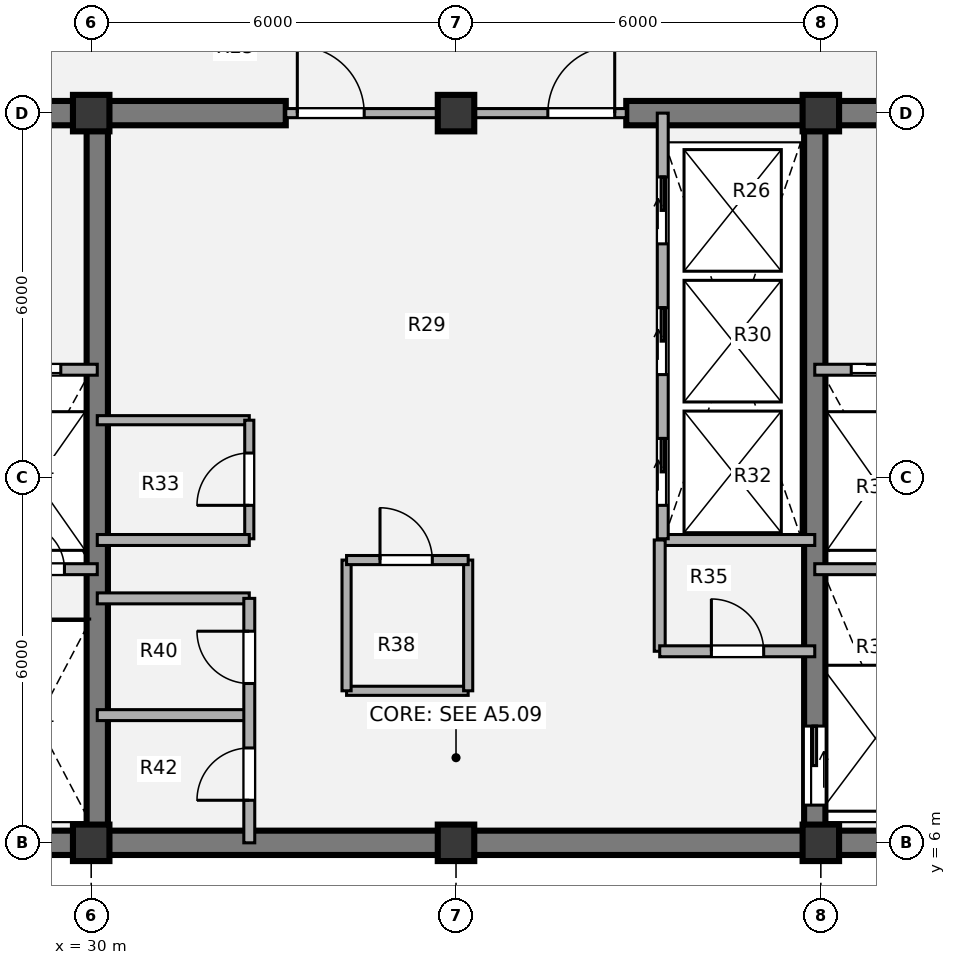
"""IFC4 building model, lengths in metres.
Left out: names, types, materials, properties, quantities, classifications, styles, units other than length and angle.
Written with IfcOpenShell. Run it as: python <this file> out.ifc"""

import sys

from ifc_helpers import new_model, si_unit, direction, frame, frame_2d, origin, origin_2d, place, context, subcontext, project, spatial, rectangle, extrude, source, transform, mapped, element, fill, save


model = new_model("IFC4")
c1 = context("Model", 3, precision=1e-05, world=origin(), true_north=direction((0.0, 1.0)))
c2 = subcontext(c1, "Body", "Model", "MODEL_VIEW")
j1 = project(units=[si_unit("LENGTHUNIT", "METRE"), si_unit("PLANEANGLEUNIT", "RADIAN")], contexts=[c1])
p1 = place(None, origin())
s1 = spatial("IfcSite", under=j1, at=p1, CompositionType="ELEMENT")
p2 = place(p1, origin())
s2 = spatial("IfcBuilding", under=s1, at=p2, CompositionType="ELEMENT")
p3 = place(p2, frame((0.0, 0.0, 264.6)))
s3 = spatial("IfcBuildingStorey", under=s2, at=p3, CompositionType="ELEMENT", Elevation=264.6)
m1 = source(origin(), c2, "Body", "SweptSolid", [
    extrude(rectangle(XDim=0.6, YDim=0.6, at=origin_2d()), origin(), (0.0, 0.0, 1.0), 3.78),
])
for number, where, z_axis, x_axis in (
    (1, (30.0, 6.0, 0.0), (0.0, 0.0, 1.0), (1.0, 0.0, 0.0)),
    (2, (36.0, 6.0, 0.0), (0.0, 0.0, 1.0), (1.0, 0.0, 0.0)),
    (3, (42.0, 6.0, 0.0), (0.0, 0.0, 1.0), (1.0, 0.0, 0.0)),
    (4, (30.0, 18.0, 0.0), (0.0, 0.0, 1.0), (1.0, 0.0, 0.0)),
    (5, (36.0, 18.0, 0.0), (0.0, 0.0, 1.0), (1.0, 0.0, 0.0)),
    (6, (42.0, 18.0, 0.0), (0.0, 0.0, 1.0), (1.0, 0.0, 0.0)),
):
    element("IfcColumn", number, at=place(p3, frame(where, z_axis=z_axis, x_axis=x_axis)), inside=s3, PredefinedType="COLUMN", context=c2, shape_type="MappedRepresentation", body=[
        mapped(m1, transform((0.0, 0.0, 0.0), x_axis=(1.0, 0.0, 0.0), y_axis=(0.0, 1.0, 0.0), z_axis=(0.0, 0.0, 1.0), scale=1.0)),
    ])
p4 = place(p3, frame((48.2, 6.0, 0.0), z_axis=(0.0, 0.0, 1.0), x_axis=(-1.0, 0.0, 0.0)))
e7 = element("IfcWall", 7, at=p4, inside=s3, PredefinedType="SHEAR", context=c2, shape_type="SweptSolid", body=[
    extrude(rectangle(XDim=24.4, YDim=0.4, at=frame_2d((12.2, 0.0))), origin(), (0.0, 0.0, 1.0), 3.78),
])
p5 = place(p3, frame((23.8, 18.0, 0.0), z_axis=(0.0, 0.0, 1.0), x_axis=(1.0, 0.0, 0.0)))
e8 = element("IfcWall", 8, at=p5, inside=s3, PredefinedType="SHEAR", context=c2, shape_type="SweptSolid", body=[
    extrude(rectangle(XDim=9.4, YDim=0.4, at=frame_2d((4.7, 0.0))), origin(), (0.0, 0.0, 1.0), 3.78),
])
p6 = place(p5, frame((2.95, 0.0, 0.0)))
e9 = element("IfcOpeningElement", 9, at=p6, cuts=e8, PredefinedType="OPENING", context=c2, shape_type="SweptSolid", body=[
    extrude(rectangle(XDim=1.1, YDim=2.1, at=origin_2d()), frame((0.55, 0.21, 1.05), z_axis=(0.0, -1.0, 0.0), x_axis=(1.0, 0.0, 0.0)), (0.0, 0.0, 1.0), 0.42),
])
p7 = place(p3, frame((38.8, 18.0, 0.0), z_axis=(0.0, 0.0, 1.0), x_axis=(1.0, 0.0, 0.0)))
e10 = element("IfcWall", 10, at=p7, inside=s3, PredefinedType="SHEAR", context=c2, shape_type="SweptSolid", body=[
    extrude(rectangle(XDim=9.4, YDim=0.4, at=frame_2d((4.7, 0.0))), origin(), (0.0, 0.0, 1.0), 3.78),
])
p8 = place(p7, frame((5.45, 0.0, 0.0)))
e11 = element("IfcOpeningElement", 11, at=p8, cuts=e10, PredefinedType="OPENING", context=c2, shape_type="SweptSolid", body=[
    extrude(rectangle(XDim=1.1, YDim=2.1, at=origin_2d()), frame((0.55, 0.21, 1.05), z_axis=(0.0, -1.0, 0.0), x_axis=(1.0, 0.0, 0.0)), (0.0, 0.0, 1.0), 0.42),
])
p9 = place(p3, frame((30.1, 6.0, 0.0), z_axis=(0.0, 0.0, 1.0), x_axis=(0.0, 1.0, 0.0)))
e12 = element("IfcWall", 12, at=p9, inside=s3, PredefinedType="SHEAR", context=c2, shape_type="SweptSolid", body=[
    extrude(rectangle(XDim=12.0, YDim=0.35, at=frame_2d((6.0, 0.0))), origin(), (0.0, 0.0, 1.0), 3.78),
])
p10 = place(p3, frame((41.9, 18.0, 0.0), z_axis=(0.0, 0.0, 1.0), x_axis=(0.0, -1.0, 0.0)))
e13 = element("IfcWall", 13, at=p10, inside=s3, PredefinedType="SHEAR", context=c2, shape_type="SweptSolid", body=[
    extrude(rectangle(XDim=12.0, YDim=0.35, at=frame_2d((6.0, 0.0))), origin(), (0.0, 0.0, 1.0), 3.78),
])
p11 = place(p10, frame((10.08, 0.0, 0.0)))
e14 = element("IfcOpeningElement", 14, at=p11, cuts=e13, PredefinedType="OPENING", context=c2, shape_type="SweptSolid", body=[
    extrude(rectangle(XDim=1.3, YDim=2.1, at=origin_2d()), frame((0.65, 0.185, 1.05), z_axis=(0.0, -1.0, 0.0), x_axis=(1.0, 0.0, 0.0)), (0.0, 0.0, 1.0), 0.37),
])
p12 = place(p3, frame((30.1, 12.95, 0.0), z_axis=(0.0, 0.0, 1.0), x_axis=(1.0, 0.0, 0.0)))
e15 = element("IfcWall", 15, at=p12, inside=s3, PredefinedType="PARTITIONING", context=c2, shape_type="SweptSolid", body=[
    extrude(rectangle(XDim=2.5, YDim=0.15, at=frame_2d((1.25, 0.0))), origin(), (0.0, 0.0, 1.0), 3.5),
])
p13 = place(p3, frame((32.6, 11.0, 0.0), z_axis=(0.0, 0.0, 1.0), x_axis=(0.0, 1.0, 0.0)))
e16 = element("IfcWall", 16, at=p13, inside=s3, PredefinedType="PARTITIONING", context=c2, shape_type="SweptSolid", body=[
    extrude(rectangle(XDim=1.95, YDim=0.15, at=frame_2d((0.975, 0.0))), origin(), (0.0, 0.0, 1.0), 3.5),
])
p14 = place(p13, frame((0.55, 0.0, 0.0)))
e17 = element("IfcOpeningElement", 17, at=p14, cuts=e16, PredefinedType="OPENING", context=c2, shape_type="SweptSolid", body=[
    extrude(rectangle(XDim=0.86, YDim=2.1, at=origin_2d()), frame((0.43, 0.085, 1.05), z_axis=(0.0, -1.0, 0.0), x_axis=(1.0, 0.0, 0.0)), (0.0, 0.0, 1.0), 0.17),
])
p15 = place(p3, frame((34.2, 8.5, 0.0), z_axis=(0.0, 0.0, 1.0), x_axis=(1.0, 0.0, 0.0)))
e18 = element("IfcWall", 18, at=p15, inside=s3, PredefinedType="PARTITIONING", context=c2, shape_type="SweptSolid", body=[
    extrude(rectangle(XDim=2.0, YDim=0.15, at=frame_2d((1.0, 0.0))), origin(), (0.0, 0.0, 1.0), 3.5),
])
p16 = place(p3, frame((34.2, 8.5, 0.0), z_axis=(0.0, 0.0, 1.0), x_axis=(0.0, 1.0, 0.0)))
e19 = element("IfcWall", 19, at=p16, inside=s3, PredefinedType="PARTITIONING", context=c2, shape_type="SweptSolid", body=[
    extrude(rectangle(XDim=2.15, YDim=0.15, at=frame_2d((1.075, 0.0))), origin(), (0.0, 0.0, 1.0), 3.5),
])
p17 = place(p3, frame((36.2, 8.5, 0.0), z_axis=(0.0, 0.0, 1.0), x_axis=(0.0, 1.0, 0.0)))
e20 = element("IfcWall", 20, at=p17, inside=s3, PredefinedType="PARTITIONING", context=c2, shape_type="SweptSolid", body=[
    extrude(rectangle(XDim=2.15, YDim=0.15, at=frame_2d((1.075, 0.0))), origin(), (0.0, 0.0, 1.0), 2.715),
])
p18 = place(p3, frame((34.2, 10.65, 0.0), z_axis=(0.0, 0.0, 1.0), x_axis=(1.0, 0.0, 0.0)))
e21 = element("IfcWall", 21, at=p18, inside=s3, PredefinedType="PARTITIONING", context=c2, shape_type="SweptSolid", body=[
    extrude(rectangle(XDim=2.0, YDim=0.15, at=frame_2d((1.0, 0.0))), origin(), (0.0, 0.0, 1.0), 3.5),
])
p19 = place(p18, frame((0.55, 0.0, 0.0)))
e22 = element("IfcOpeningElement", 22, at=p19, cuts=e21, PredefinedType="OPENING", context=c2, shape_type="SweptSolid", body=[
    extrude(rectangle(XDim=0.86, YDim=2.1, at=origin_2d()), frame((0.43, 0.085, 1.05), z_axis=(0.0, -1.0, 0.0), x_axis=(1.0, 0.0, 0.0)), (0.0, 0.0, 1.0), 0.17),
])
p20 = place(p3, frame((30.1, 10.98, 0.0), z_axis=(0.0, 0.0, 1.0), x_axis=(1.0, 0.0, 0.0)))
e23 = element("IfcWall", 23, at=p20, inside=s3, PredefinedType="PARTITIONING", context=c2, shape_type="SweptSolid", body=[
    extrude(rectangle(XDim=2.5, YDim=0.18, at=frame_2d((1.25, 0.0))), origin(), (0.0, 0.0, 1.0), 3.5),
])
p21 = place(p3, frame((39.35, 10.98, 0.0), z_axis=(0.0, 0.0, 1.0), x_axis=(1.0, 0.0, 0.0)))
e24 = element("IfcWall", 24, at=p21, inside=s3, PredefinedType="PARTITIONING", context=c2, shape_type="SweptSolid", body=[
    extrude(rectangle(XDim=2.55, YDim=0.18, at=frame_2d((1.275, 0.0))), origin(), (0.0, 0.0, 1.0), 3.5),
])
for number, where, z_axis, x_axis in (
    (25, (30.1, 8.1, 0.0), (0.0, 0.0, 1.0), (1.0, 0.0, 0.0)),
    (26, (30.1, 10.02, 0.0), (0.0, 0.0, 1.0), (1.0, 0.0, 0.0)),
):
    element("IfcWall", number, at=place(p3, frame(where, z_axis=z_axis, x_axis=x_axis)), inside=s3, PredefinedType="PARTITIONING", context=c2, shape_type="SweptSolid", body=[
        extrude(rectangle(XDim=2.5, YDim=0.18, at=frame_2d((1.25, 0.0))), origin(), (0.0, 0.0, 1.0), 3.5),
    ])
p22 = place(p3, frame((32.6, 6.0, 0.0), z_axis=(0.0, 0.0, 1.0), x_axis=(0.0, 1.0, 0.0)))
e27 = element("IfcWall", 27, at=p22, inside=s3, PredefinedType="PARTITIONING", context=c2, shape_type="SweptSolid", body=[
    extrude(rectangle(XDim=4.02, YDim=0.18, at=frame_2d((2.01, 0.0))), origin(), (0.0, 0.0, 1.0), 3.5),
])
p23 = place(p22, frame((0.7, 0.0, 0.0)))
e28 = element("IfcOpeningElement", 28, at=p23, cuts=e27, PredefinedType="OPENING", context=c2, shape_type="SweptSolid", body=[
    extrude(rectangle(XDim=0.86, YDim=2.1, at=origin_2d()), frame((0.43, 0.1, 1.05), z_axis=(0.0, -1.0, 0.0), x_axis=(1.0, 0.0, 0.0)), (0.0, 0.0, 1.0), 0.2),
])
p24 = place(p22, frame((2.62, 0.0, 0.0)))
e29 = element("IfcOpeningElement", 29, at=p24, cuts=e27, PredefinedType="OPENING", context=c2, shape_type="SweptSolid", body=[
    extrude(rectangle(XDim=0.86, YDim=2.1, at=origin_2d()), frame((0.43, 0.1, 1.05), z_axis=(0.0, -1.0, 0.0), x_axis=(1.0, 0.0, 0.0)), (0.0, 0.0, 1.0), 0.2),
])
p25 = place(p3, frame((39.35, 9.15, 0.0), z_axis=(0.0, 0.0, 1.0), x_axis=(0.0, 1.0, 0.0)))
e30 = element("IfcWall", 30, at=p25, inside=s3, PredefinedType="PARTITIONING", context=c2, shape_type="SweptSolid", body=[
    extrude(rectangle(XDim=1.83, YDim=0.18, at=frame_2d((0.915, 0.0))), origin(), (0.0, 0.0, 1.0), 3.5),
])
p26 = place(p3, frame((39.35, 9.15, 0.0), z_axis=(0.0, 0.0, 1.0), x_axis=(1.0, 0.0, 0.0)))
e31 = element("IfcWall", 31, at=p26, inside=s3, PredefinedType="PARTITIONING", context=c2, shape_type="SweptSolid", body=[
    extrude(rectangle(XDim=2.55, YDim=0.18, at=frame_2d((1.275, 0.0))), origin(), (0.0, 0.0, 1.0), 3.5),
])
p27 = place(p26, frame((0.85, 0.0, 0.0)))
e32 = element("IfcOpeningElement", 32, at=p27, cuts=e31, PredefinedType="OPENING", context=c2, shape_type="SweptSolid", body=[
    extrude(rectangle(XDim=0.86, YDim=2.1, at=origin_2d()), frame((0.43, 0.1, 1.05), z_axis=(0.0, -1.0, 0.0), x_axis=(1.0, 0.0, 0.0)), (0.0, 0.0, 1.0), 0.2),
])
p28 = place(p3, frame((33.2, 18.0, 0.0), z_axis=(0.0, 0.0, 1.0), x_axis=(1.0, 0.0, 0.0)))
e33 = element("IfcWall", 33, at=p28, inside=s3, PredefinedType="PARTITIONING", context=c2, shape_type="SweptSolid", body=[
    extrude(rectangle(XDim=5.6, YDim=0.15, at=frame_2d((2.8, 0.0))), origin(), (0.0, 0.0, 1.0), 2.515),
])
p29 = place(p28, frame((0.19, 0.0, 0.0)))
e34 = element("IfcOpeningElement", 34, at=p29, cuts=e33, PredefinedType="OPENING", context=c2, shape_type="SweptSolid", body=[
    extrude(rectangle(XDim=1.1, YDim=2.1, at=origin_2d()), frame((0.55, 0.085, 1.05), z_axis=(0.0, -1.0, 0.0), x_axis=(1.0, 0.0, 0.0)), (0.0, 0.0, 1.0), 0.17),
])
p30 = place(p28, frame((4.31, 0.0, 0.0)))
e35 = element("IfcOpeningElement", 35, at=p30, cuts=e33, PredefinedType="OPENING", context=c2, shape_type="SweptSolid", body=[
    extrude(rectangle(XDim=1.1, YDim=2.1, at=origin_2d()), frame((0.55, 0.085, 1.05), z_axis=(0.0, -1.0, 0.0), x_axis=(1.0, 0.0, 0.0)), (0.0, 0.0, 1.0), 0.17),
])
p31 = place(p3, frame((24.0, 13.78, 0.0), z_axis=(0.0, 0.0, 1.0), x_axis=(1.0, 0.0, 0.0)))
e36 = element("IfcWall", 36, at=p31, inside=s3, PredefinedType="PARTITIONING", context=c2, shape_type="SweptSolid", body=[
    extrude(rectangle(XDim=6.1, YDim=0.18, at=frame_2d((3.05, 0.0))), origin(), (0.0, 0.0, 1.0), 3.5),
])
p32 = place(p31, frame((1.15, 0.0, 0.0)))
e37 = element("IfcOpeningElement", 37, at=p32, cuts=e36, PredefinedType="OPENING", context=c2, shape_type="SweptSolid", body=[
    extrude(rectangle(XDim=1.1, YDim=2.1, at=origin_2d()), frame((0.55, 0.1, 1.05), z_axis=(0.0, -1.0, 0.0), x_axis=(1.0, 0.0, 0.0)), (0.0, 0.0, 1.0), 0.2),
])
p33 = place(p31, frame((4.4, 0.0, 0.0)))
e38 = element("IfcOpeningElement", 38, at=p33, cuts=e36, PredefinedType="OPENING", context=c2, shape_type="SweptSolid", body=[
    extrude(rectangle(XDim=1.1, YDim=2.1, at=origin_2d()), frame((0.55, 0.1, 1.05), z_axis=(0.0, -1.0, 0.0), x_axis=(1.0, 0.0, 0.0)), (0.0, 0.0, 1.0), 0.2),
])
p34 = place(p3, frame((28.15, 10.5, 0.0), z_axis=(0.0, 0.0, 1.0), x_axis=(1.0, 0.0, 0.0)))
e39 = element("IfcWall", 39, at=p34, inside=s3, PredefinedType="PARTITIONING", context=c2, shape_type="SweptSolid", body=[
    extrude(rectangle(XDim=1.95, YDim=0.18, at=frame_2d((0.975, 0.0))), origin(), (0.0, 0.0, 1.0), 3.5),
])
p35 = place(p34, frame((0.65, 0.0, 0.0)))
e40 = element("IfcOpeningElement", 40, at=p35, cuts=e39, PredefinedType="OPENING", context=c2, shape_type="SweptSolid", body=[
    extrude(rectangle(XDim=0.76, YDim=2.05, at=origin_2d()), frame((0.38, 0.1, 1.025), z_axis=(0.0, -1.0, 0.0), x_axis=(1.0, 0.0, 0.0)), (0.0, 0.0, 1.0), 0.2),
])
p36 = place(p3, frame((41.9, 13.78, 0.0), z_axis=(0.0, 0.0, 1.0), x_axis=(1.0, 0.0, 0.0)))
e41 = element("IfcWall", 41, at=p36, inside=s3, PredefinedType="PARTITIONING", context=c2, shape_type="SweptSolid", body=[
    extrude(rectangle(XDim=6.1, YDim=0.18, at=frame_2d((3.05, 0.0))), origin(), (0.0, 0.0, 1.0), 3.5),
])
p37 = place(p36, frame((0.6, 0.0, 0.0)))
e42 = element("IfcOpeningElement", 42, at=p37, cuts=e41, PredefinedType="OPENING", context=c2, shape_type="SweptSolid", body=[
    extrude(rectangle(XDim=1.1, YDim=2.1, at=origin_2d()), frame((0.55, 0.1, 1.05), z_axis=(0.0, -1.0, 0.0), x_axis=(1.0, 0.0, 0.0)), (0.0, 0.0, 1.0), 0.2),
])
p38 = place(p36, frame((3.8, 0.0, 0.0)))
e43 = element("IfcOpeningElement", 43, at=p38, cuts=e41, PredefinedType="OPENING", context=c2, shape_type="SweptSolid", body=[
    extrude(rectangle(XDim=1.1, YDim=2.1, at=origin_2d()), frame((0.55, 0.1, 1.05), z_axis=(0.0, -1.0, 0.0), x_axis=(1.0, 0.0, 0.0)), (0.0, 0.0, 1.0), 0.2),
])
p39 = place(p3, frame((41.9, 10.5, 0.0), z_axis=(0.0, 0.0, 1.0), x_axis=(1.0, 0.0, 0.0)))
e44 = element("IfcWall", 44, at=p39, inside=s3, PredefinedType="PARTITIONING", context=c2, shape_type="SweptSolid", body=[
    extrude(rectangle(XDim=1.95, YDim=0.18, at=frame_2d((0.975, 0.0))), origin(), (0.0, 0.0, 1.0), 3.5),
])
p40 = place(p3, frame((39.4, 11.0, 0.0), z_axis=(0.0, 0.0, 1.0), x_axis=(0.0, 1.0, 0.0)))
e45 = element("IfcWall", 45, at=p40, inside=s3, PredefinedType="PARTITIONING", context=c2, shape_type="SweptSolid", body=[
    extrude(rectangle(XDim=7.0, YDim=0.18, at=frame_2d((3.5, 0.0))), origin(), (0.0, 0.0, 1.0), 3.5),
])
p41 = place(p40, frame((0.55, 0.0, 0.0)))
e46 = element("IfcOpeningElement", 46, at=p41, cuts=e45, PredefinedType="OPENING", context=c2, shape_type="SweptSolid", body=[
    extrude(rectangle(XDim=1.1, YDim=2.1, at=origin_2d()), frame((0.55, 0.1, 1.05), z_axis=(0.0, -1.0, 0.0), x_axis=(1.0, 0.0, 0.0)), (0.0, 0.0, 1.0), 0.2),
])
p42 = place(p40, frame((2.7, 0.0, 0.0)))
e47 = element("IfcOpeningElement", 47, at=p42, cuts=e45, PredefinedType="OPENING", context=c2, shape_type="SweptSolid", body=[
    extrude(rectangle(XDim=1.1, YDim=2.1, at=origin_2d()), frame((0.55, 0.1, 1.05), z_axis=(0.0, -1.0, 0.0), x_axis=(1.0, 0.0, 0.0)), (0.0, 0.0, 1.0), 0.2),
])
p43 = place(p40, frame((4.85, 0.0, 0.0)))
e48 = element("IfcOpeningElement", 48, at=p43, cuts=e45, PredefinedType="OPENING", context=c2, shape_type="SweptSolid", body=[
    extrude(rectangle(XDim=1.1, YDim=2.1, at=origin_2d()), frame((0.55, 0.1, 1.05), z_axis=(0.0, -1.0, 0.0), x_axis=(1.0, 0.0, 0.0)), (0.0, 0.0, 1.0), 0.2),
])
m2 = source(origin(), c2, "Body", "SweptSolid", [
    extrude(rectangle(XDim=0.86, YDim=2.1, at=origin_2d()), frame((0.43, 0.025, 1.05), z_axis=(0.0, -1.0, 0.0), x_axis=(1.0, 0.0, 0.0)), (0.0, 0.0, 1.0), 0.05),
])
p44 = place(p14, origin())
e49 = element("IfcDoor", 49, at=p44, inside=s3, OperationType="SINGLE_SWING_LEFT", PredefinedType="DOOR", context=c2, shape_type="MappedRepresentation", body=[
    mapped(m2, transform((0.0, 0.0, 0.0), x_axis=(1.0, 0.0, 0.0), y_axis=(0.0, 1.0, 0.0), z_axis=(0.0, 0.0, 1.0), scale=1.0)),
])
fill(e17, e49)
p45 = place(p19, origin())
e50 = element("IfcDoor", 50, at=p45, inside=s3, OperationType="SINGLE_SWING_LEFT", PredefinedType="DOOR", context=c2, shape_type="MappedRepresentation", body=[
    mapped(m2, transform((0.0, 0.0, 0.0), x_axis=(1.0, 0.0, 0.0), y_axis=(0.0, 1.0, 0.0), z_axis=(0.0, 0.0, 1.0), scale=1.0)),
])
fill(e22, e50)
p46 = place(p23, origin())
e51 = element("IfcDoor", 51, at=p46, inside=s3, OperationType="SINGLE_SWING_LEFT", PredefinedType="DOOR", context=c2, shape_type="MappedRepresentation", body=[
    mapped(m2, transform((0.0, 0.0, 0.0), x_axis=(1.0, 0.0, 0.0), y_axis=(0.0, 1.0, 0.0), z_axis=(0.0, 0.0, 1.0), scale=1.0)),
])
fill(e28, e51)
p47 = place(p24, origin())
e52 = element("IfcDoor", 52, at=p47, inside=s3, OperationType="SINGLE_SWING_RIGHT", PredefinedType="DOOR", context=c2, shape_type="MappedRepresentation", body=[
    mapped(m2, transform((0.0, 0.0, 0.0), x_axis=(1.0, 0.0, 0.0), y_axis=(0.0, 1.0, 0.0), z_axis=(0.0, 0.0, 1.0), scale=1.0)),
])
fill(e29, e52)
p48 = place(p27, origin())
e53 = element("IfcDoor", 53, at=p48, inside=s3, OperationType="SINGLE_SWING_LEFT", PredefinedType="DOOR", context=c2, shape_type="MappedRepresentation", body=[
    mapped(m2, transform((0.0, 0.0, 0.0), x_axis=(1.0, 0.0, 0.0), y_axis=(0.0, 1.0, 0.0), z_axis=(0.0, 0.0, 1.0), scale=1.0)),
])
fill(e32, e53)
m3 = source(origin(), c2, "Body", "SweptSolid", [
    extrude(rectangle(XDim=1.1, YDim=2.1, at=origin_2d()), frame((0.55, 0.025, 1.05), z_axis=(0.0, -1.0, 0.0), x_axis=(1.0, 0.0, 0.0)), (0.0, 0.0, 1.0), 0.05),
])
p49 = place(p29, origin())
e54 = element("IfcDoor", 54, at=p49, inside=s3, OperationType="SINGLE_SWING_LEFT", PredefinedType="DOOR", context=c2, shape_type="MappedRepresentation", body=[
    mapped(m3, transform((0.0, 0.0, 0.0), x_axis=(1.0, 0.0, 0.0), y_axis=(0.0, 1.0, 0.0), z_axis=(0.0, 0.0, 1.0), scale=1.0)),
])
fill(e34, e54)
p50 = place(p30, origin())
e55 = element("IfcDoor", 55, at=p50, inside=s3, OperationType="SINGLE_SWING_RIGHT", PredefinedType="DOOR", context=c2, shape_type="MappedRepresentation", body=[
    mapped(m3, transform((0.0, 0.0, 0.0), x_axis=(1.0, 0.0, 0.0), y_axis=(0.0, 1.0, 0.0), z_axis=(0.0, 0.0, 1.0), scale=1.0)),
])
fill(e35, e55)
m4 = source(origin(), c2, "Body", "SweptSolid", [
    extrude(rectangle(XDim=1.1, YDim=2.1, at=origin_2d()), frame((0.55, 0.025, 1.05), z_axis=(0.0, -1.0, 0.0), x_axis=(1.0, 0.0, 0.0)), (0.0, 0.0, 1.0), 0.05),
])
p51 = place(p33, origin())
e56 = element("IfcDoor", 56, at=p51, inside=s3, OperationType="SLIDING_TO_LEFT", PredefinedType="DOOR", context=c2, shape_type="MappedRepresentation", body=[
    mapped(m4, transform((0.0, 0.0, 0.0), x_axis=(1.0, 0.0, 0.0), y_axis=(0.0, 1.0, 0.0), z_axis=(0.0, 0.0, 1.0), scale=1.0)),
])
fill(e38, e56)
m5 = source(origin(), c2, "Body", "SweptSolid", [
    extrude(rectangle(XDim=0.76, YDim=2.05, at=origin_2d()), frame((0.38, 0.025, 1.025), z_axis=(0.0, -1.0, 0.0), x_axis=(1.0, 0.0, 0.0)), (0.0, 0.0, 1.0), 0.05),
])
p52 = place(p35, origin())
e57 = element("IfcDoor", 57, at=p52, inside=s3, OperationType="SINGLE_SWING_LEFT", PredefinedType="DOOR", context=c2, shape_type="MappedRepresentation", body=[
    mapped(m5, transform((0.0, 0.0, 0.0), x_axis=(1.0, 0.0, 0.0), y_axis=(0.0, 1.0, 0.0), z_axis=(0.0, 0.0, 1.0), scale=1.0)),
])
fill(e40, e57)
p53 = place(p37, origin())
e58 = element("IfcDoor", 58, at=p53, inside=s3, OperationType="SLIDING_TO_RIGHT", PredefinedType="DOOR", context=c2, shape_type="MappedRepresentation", body=[
    mapped(m4, transform((0.0, 0.0, 0.0), x_axis=(1.0, 0.0, 0.0), y_axis=(0.0, 1.0, 0.0), z_axis=(0.0, 0.0, 1.0), scale=1.0)),
])
fill(e42, e58)
m6 = source(origin(), c2, "Body", "SweptSolid", [
    extrude(rectangle(XDim=1.3, YDim=2.1, at=origin_2d()), frame((0.65, 0.025, 1.05), z_axis=(0.0, -1.0, 0.0), x_axis=(1.0, 0.0, 0.0)), (0.0, 0.0, 1.0), 0.05),
])
p54 = place(p11, origin())
e59 = element("IfcDoor", 59, at=p54, inside=s3, OperationType="SLIDING_TO_LEFT", PredefinedType="DOOR", context=c2, shape_type="MappedRepresentation", body=[
    mapped(m6, transform((0.0, 0.0, 0.0), x_axis=(1.0, 0.0, 0.0), y_axis=(0.0, 1.0, 0.0), z_axis=(0.0, 0.0, 1.0), scale=1.0)),
])
fill(e14, e59)
p55 = place(p41, origin())
e60 = element("IfcDoor", 60, at=p55, inside=s3, OperationType="SLIDING_TO_RIGHT", PredefinedType="DOOR", context=c2, shape_type="MappedRepresentation", body=[
    mapped(m4, transform((0.0, 0.0, 0.0), x_axis=(1.0, 0.0, 0.0), y_axis=(0.0, 1.0, 0.0), z_axis=(0.0, 0.0, 1.0), scale=1.0)),
])
fill(e46, e60)
p56 = place(p42, origin())
e61 = element("IfcDoor", 61, at=p56, inside=s3, OperationType="SLIDING_TO_RIGHT", PredefinedType="DOOR", context=c2, shape_type="MappedRepresentation", body=[
    mapped(m4, transform((0.0, 0.0, 0.0), x_axis=(1.0, 0.0, 0.0), y_axis=(0.0, 1.0, 0.0), z_axis=(0.0, 0.0, 1.0), scale=1.0)),
])
fill(e47, e61)
p57 = place(p43, origin())
e62 = element("IfcDoor", 62, at=p57, inside=s3, OperationType="SLIDING_TO_RIGHT", PredefinedType="DOOR", context=c2, shape_type="MappedRepresentation", body=[
    mapped(m4, transform((0.0, 0.0, 0.0), x_axis=(1.0, 0.0, 0.0), y_axis=(0.0, 1.0, 0.0), z_axis=(0.0, 0.0, 1.0), scale=1.0)),
])
fill(e48, e62)
save(model, sys.argv[1])
